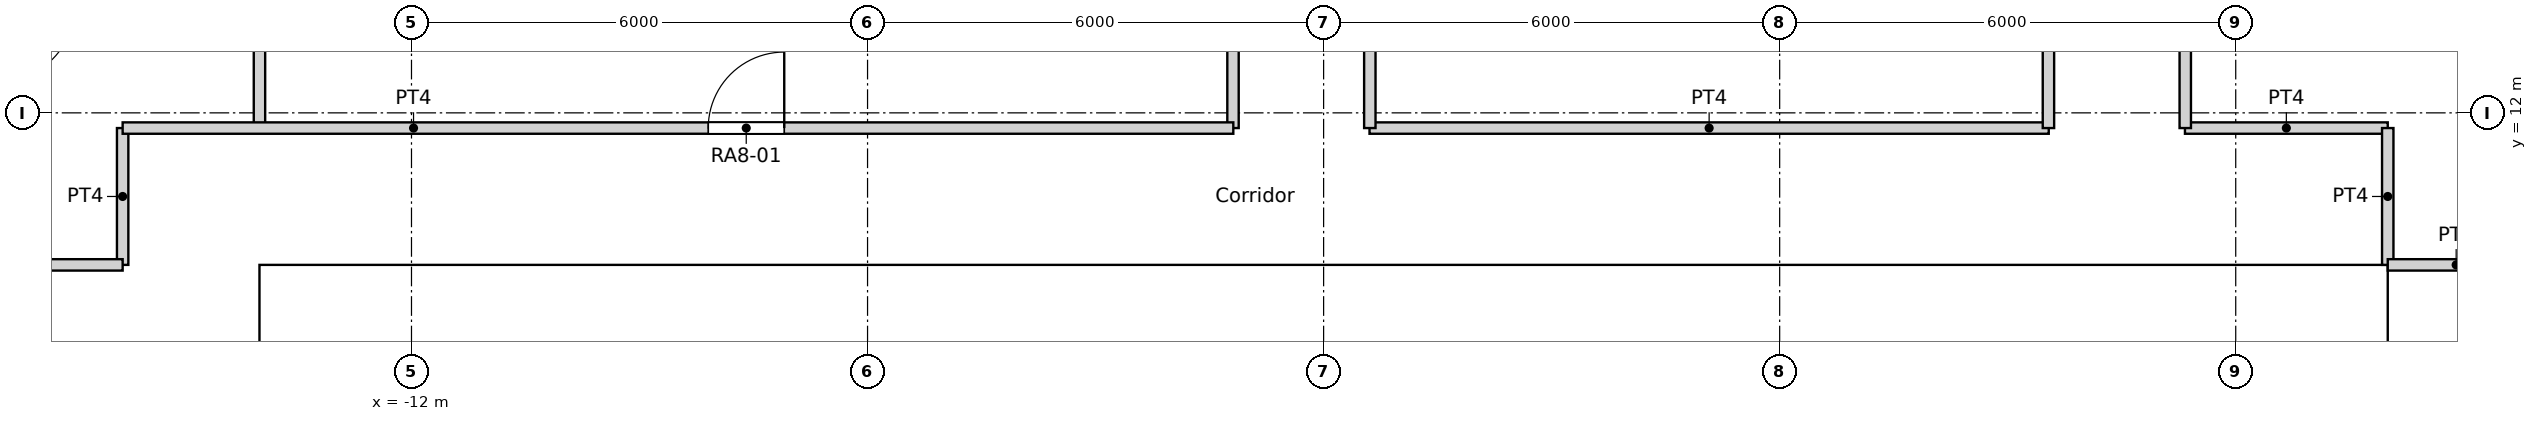
"""IFC4 building model, lengths in metres.
Left out: names, types, materials, properties, quantities, classifications, styles, units other than length and angle.
Written with IfcOpenShell. Run it as: python <this file> out.ifc"""

import sys

from ifc_helpers import new_model, si_unit, direction, frame, frame_2d, origin, origin_2d, place, context, subcontext, project, spatial, rectangle, circle, extrude, element, fill, save


model = new_model("IFC4")
c1 = context("Model", 3, precision=1e-05, world=origin(), true_north=direction((0.0, 1.0)))
c2 = subcontext(c1, "Body", "Model", "MODEL_VIEW")
j1 = project(units=[si_unit("LENGTHUNIT", "METRE"), si_unit("PLANEANGLEUNIT", "RADIAN")], contexts=[c1])
p1 = place(None, origin())
s1 = spatial("IfcSite", under=j1, at=p1, CompositionType="ELEMENT")
p2 = place(p1, origin())
s2 = spatial("IfcBuilding", under=s1, at=p2, CompositionType="ELEMENT")
p3 = place(p2, frame((0.0, 0.0, 103.8)))
s3 = spatial("IfcBuildingStorey", under=s2, at=p3, CompositionType="ELEMENT", Elevation=103.8)
for number, where, z_axis, x_axis in (
    (1, (15.552, 10.603, 0.0), (0.0, 0.0, 1.0), (1.0, 0.0, 0.0)),
    (2, (-13.798, 12.802, 0.0), (0.0, 0.0, 1.0), (1.0, 0.0, 0.0)),
):
    element("IfcColumn", number, at=place(p3, frame(where, z_axis=z_axis, x_axis=x_axis)), inside=s3, PredefinedType="COLUMN", context=c2, shape_type="SweptSolid", body=[
        extrude(circle(Radius=0.7, at=origin_2d()), origin(), (0.0, 0.0, 1.0), 3.6),
    ])
p4 = place(p3, frame((-14.0, 9.4, 0.0), z_axis=(0.0, 0.0, 1.0), x_axis=(1.0, 0.0, 0.0)))
e3 = element("IfcWall", 3, at=p4, inside=s3, PredefinedType="SOLIDWALL", context=c2, shape_type="SweptSolid", body=[
    extrude(rectangle(XDim=28.0, YDim=1.2, at=frame_2d((14.0, 0.0))), origin(), (0.0, 0.0, 1.0), 3.6),
])
p5 = place(p4, frame((9.8, 0.0, 0.0)))
e4 = element("IfcOpeningElement", 4, at=p5, cuts=e3, PredefinedType="OPENING", context=c2, shape_type="SweptSolid", body=[
    extrude(rectangle(XDim=1.8, YDim=2.1, at=frame_2d((0.9, 1.05))), frame((0.0, 0.6, 0.0), z_axis=(0.0, -1.0, 0.0), x_axis=(1.0, 0.0, 0.0)), (0.0, 0.0, 1.0), 1.2),
])
p6 = place(p3, frame((-15.8, 11.8, 0.0), z_axis=(0.0, 0.0, 1.0), x_axis=(1.0, 0.0, 0.0)))
e5 = element("IfcWall", 5, at=p6, inside=s3, PredefinedType="PARTITIONING", context=c2, shape_type="SweptSolid", body=[
    extrude(rectangle(XDim=14.612, YDim=0.15, at=frame_2d((7.306, 0.0))), origin(), (0.0, 0.0, 1.0), 3.15),
])
p7 = place(p6, frame((7.704, 0.0, 0.0)))
e6 = element("IfcOpeningElement", 6, at=p7, cuts=e5, PredefinedType="OPENING", context=c2, shape_type="SweptSolid", body=[
    extrude(rectangle(XDim=1.0, YDim=2.04, at=frame_2d((0.5, 1.02))), frame((0.0, 0.075, 0.0), z_axis=(0.0, -1.0, 0.0), x_axis=(1.0, 0.0, 0.0)), (0.0, 0.0, 1.0), 0.15),
])
p8 = place(p3, frame((0.604, 11.8, 0.0), z_axis=(0.0, 0.0, 1.0), x_axis=(1.0, 0.0, 0.0)))
e7 = element("IfcWall", 7, at=p8, inside=s3, PredefinedType="PARTITIONING", context=c2, shape_type="SweptSolid", body=[
    extrude(rectangle(XDim=8.936, YDim=0.15, at=frame_2d((4.468, 0.0))), origin(), (0.0, 0.0, 1.0), 3.15),
])
p9 = place(p3, frame((11.332, 11.8, 0.0), z_axis=(0.0, 0.0, 1.0), x_axis=(1.0, 0.0, 0.0)))
e8 = element("IfcWall", 8, at=p9, inside=s3, PredefinedType="PARTITIONING", context=c2, shape_type="SweptSolid", body=[
    extrude(rectangle(XDim=2.668, YDim=0.15, at=frame_2d((1.334, 0.0))), origin(), (0.0, 0.0, 1.0), 3.15),
])
for number, where, z_axis, x_axis in (
    (9, (14.0, 10.0, 0.0), (0.0, 0.0, 1.0), (0.0, 1.0, 0.0)),
    (10, (-15.8, 10.0, 0.0), (0.0, 0.0, 1.0), (0.0, 1.0, 0.0)),
    (11, (14.0, 10.0, 0.0), (0.0, 0.0, 1.0), (1.0, 0.0, 0.0)),
):
    element("IfcWall", number, at=place(p3, frame(where, z_axis=z_axis, x_axis=x_axis)), inside=s3, PredefinedType="PARTITIONING", context=c2, shape_type="SweptSolid", body=[
        extrude(rectangle(XDim=1.8, YDim=0.15, at=frame_2d((0.9, 0.0))), origin(), (0.0, 0.0, 1.0), 3.15),
    ])
p10 = place(p3, frame((-1.192, 11.8, 0.0), z_axis=(0.0, 0.0, 1.0), x_axis=(0.0, 1.0, 0.0)))
e12 = element("IfcWall", 12, at=p10, inside=s3, PredefinedType="PARTITIONING", context=c2, shape_type="SweptSolid", body=[
    extrude(rectangle(XDim=10.002, YDim=0.15, at=frame_2d((5.001, 0.0))), origin(), (0.0, 0.0, 1.0), 3.15),
])
p11 = place(p3, frame((9.536, 11.8, 0.0), z_axis=(0.0, 0.0, 1.0), x_axis=(0.0, 1.0, 0.0)))
e13 = element("IfcWall", 13, at=p11, inside=s3, PredefinedType="PARTITIONING", context=c2, shape_type="SweptSolid", body=[
    extrude(rectangle(XDim=7.869, YDim=0.15, at=frame_2d((3.935, 0.0))), origin(), (0.0, 0.0, 1.0), 3.15),
])
p12 = place(p3, frame((0.608, 11.8, 0.0), z_axis=(0.0, 0.0, 1.0), x_axis=(0.0, 1.0, 0.0)))
e14 = element("IfcWall", 14, at=p12, inside=s3, PredefinedType="PARTITIONING", context=c2, shape_type="SweptSolid", body=[
    extrude(rectangle(XDim=10.002, YDim=0.15, at=frame_2d((5.001, 0.0))), origin(), (0.0, 0.0, 1.0), 3.15),
])
p13 = place(p12, frame((4.526, 0.0, 0.0)))
e15 = element("IfcOpeningElement", 15, at=p13, cuts=e14, PredefinedType="OPENING", context=c2, shape_type="SweptSolid", body=[
    extrude(rectangle(XDim=0.95, YDim=2.1, at=frame_2d((0.475, 1.05))), frame((0.0, 0.075, 0.0), z_axis=(0.0, -1.0, 0.0), x_axis=(1.0, 0.0, 0.0)), (0.0, 0.0, 1.0), 0.15),
])
p14 = place(p3, frame((11.336, 11.8, 0.0), z_axis=(0.0, 0.0, 1.0), x_axis=(0.0, 1.0, 0.0)))
e16 = element("IfcWall", 16, at=p14, inside=s3, PredefinedType="PARTITIONING", context=c2, shape_type="SweptSolid", body=[
    extrude(rectangle(XDim=6.83, YDim=0.15, at=frame_2d((3.415, 0.0))), origin(), (0.0, 0.0, 1.0), 3.15),
])
p15 = place(p14, frame((4.24, 0.0, 0.0)))
e17 = element("IfcOpeningElement", 17, at=p15, cuts=e16, PredefinedType="OPENING", context=c2, shape_type="SweptSolid", body=[
    extrude(rectangle(XDim=0.95, YDim=2.1, at=frame_2d((0.475, 1.05))), frame((0.0, 0.075, 0.0), z_axis=(0.0, -1.0, 0.0), x_axis=(1.0, 0.0, 0.0)), (0.0, 0.0, 1.0), 0.15),
])
p16 = place(p3, frame((-19.401, 10.0, 0.0), z_axis=(0.0, 0.0, 1.0), x_axis=(0.499992689227, 0.86602962462, 0.0)))
e18 = element("IfcWall", 18, at=p16, inside=s3, PredefinedType="PARTITIONING", context=c2, shape_type="SweptSolid", body=[
    extrude(rectangle(XDim=6.882, YDim=0.15, at=frame_2d((3.441, 0.0))), origin(), (0.0, 0.0, 1.0), 3.15),
])
p17 = place(p16, frame((2.941, 0.0, 0.0)))
e19 = element("IfcOpeningElement", 19, at=p17, cuts=e18, PredefinedType="OPENING", context=c2, shape_type="SweptSolid", body=[
    extrude(rectangle(XDim=1.0, YDim=2.04, at=frame_2d((0.5, 1.02))), frame((0.0, 0.075, 0.0), z_axis=(0.0, -1.0, 0.0), x_axis=(1.0, 0.0, 0.0)), (0.0, 0.0, 1.0), 0.15),
])
p18 = place(p3, frame((-19.401, 10.0, 0.0), z_axis=(0.0, 0.0, 1.0), x_axis=(1.0, 0.0, 0.0)))
e20 = element("IfcWall", 20, at=p18, inside=s3, PredefinedType="PARTITIONING", context=c2, shape_type="SweptSolid", body=[
    extrude(rectangle(XDim=3.601, YDim=0.15, at=frame_2d((1.8, 0.0))), origin(), (0.0, 0.0, 1.0), 3.15),
])
p19 = place(p3, frame((-14.0, 11.8, 0.0), z_axis=(0.0, 0.0, 1.0), x_axis=(0.0, 1.0, 0.0)))
e21 = element("IfcWall", 21, at=p19, inside=s3, PredefinedType="PARTITIONING", context=c2, shape_type="SweptSolid", body=[
    extrude(rectangle(XDim=5.292, YDim=0.15, at=frame_2d((2.646, 0.0))), origin(), (0.0, 0.0, 1.0), 3.15),
])
p20 = place(p5, origin())
e22 = element("IfcDoor", 22, at=p20, inside=s3, OperationType="DOUBLE_DOOR_SINGLE_SWING", PredefinedType="DOOR", context=c2, shape_type="SweptSolid", body=[
    extrude(rectangle(XDim=1.8, YDim=2.1, at=frame_2d((0.9, 1.05))), frame((0.0, 0.025, 0.0), z_axis=(0.0, -1.0, 0.0), x_axis=(1.0, 0.0, 0.0)), (0.0, 0.0, 1.0), 0.05),
])
fill(e4, e22)
p21 = place(p7, origin())
e23 = element("IfcDoor", 23, at=p21, inside=s3, OperationType="SINGLE_SWING_RIGHT", PredefinedType="DOOR", context=c2, shape_type="SweptSolid", body=[
    extrude(rectangle(XDim=1.0, YDim=2.04, at=frame_2d((0.5, 1.02))), frame((0.0, 0.025, 0.0), z_axis=(0.0, -1.0, 0.0), x_axis=(1.0, 0.0, 0.0)), (0.0, 0.0, 1.0), 0.05),
])
fill(e6, e23)
save(model, sys.argv[1])
